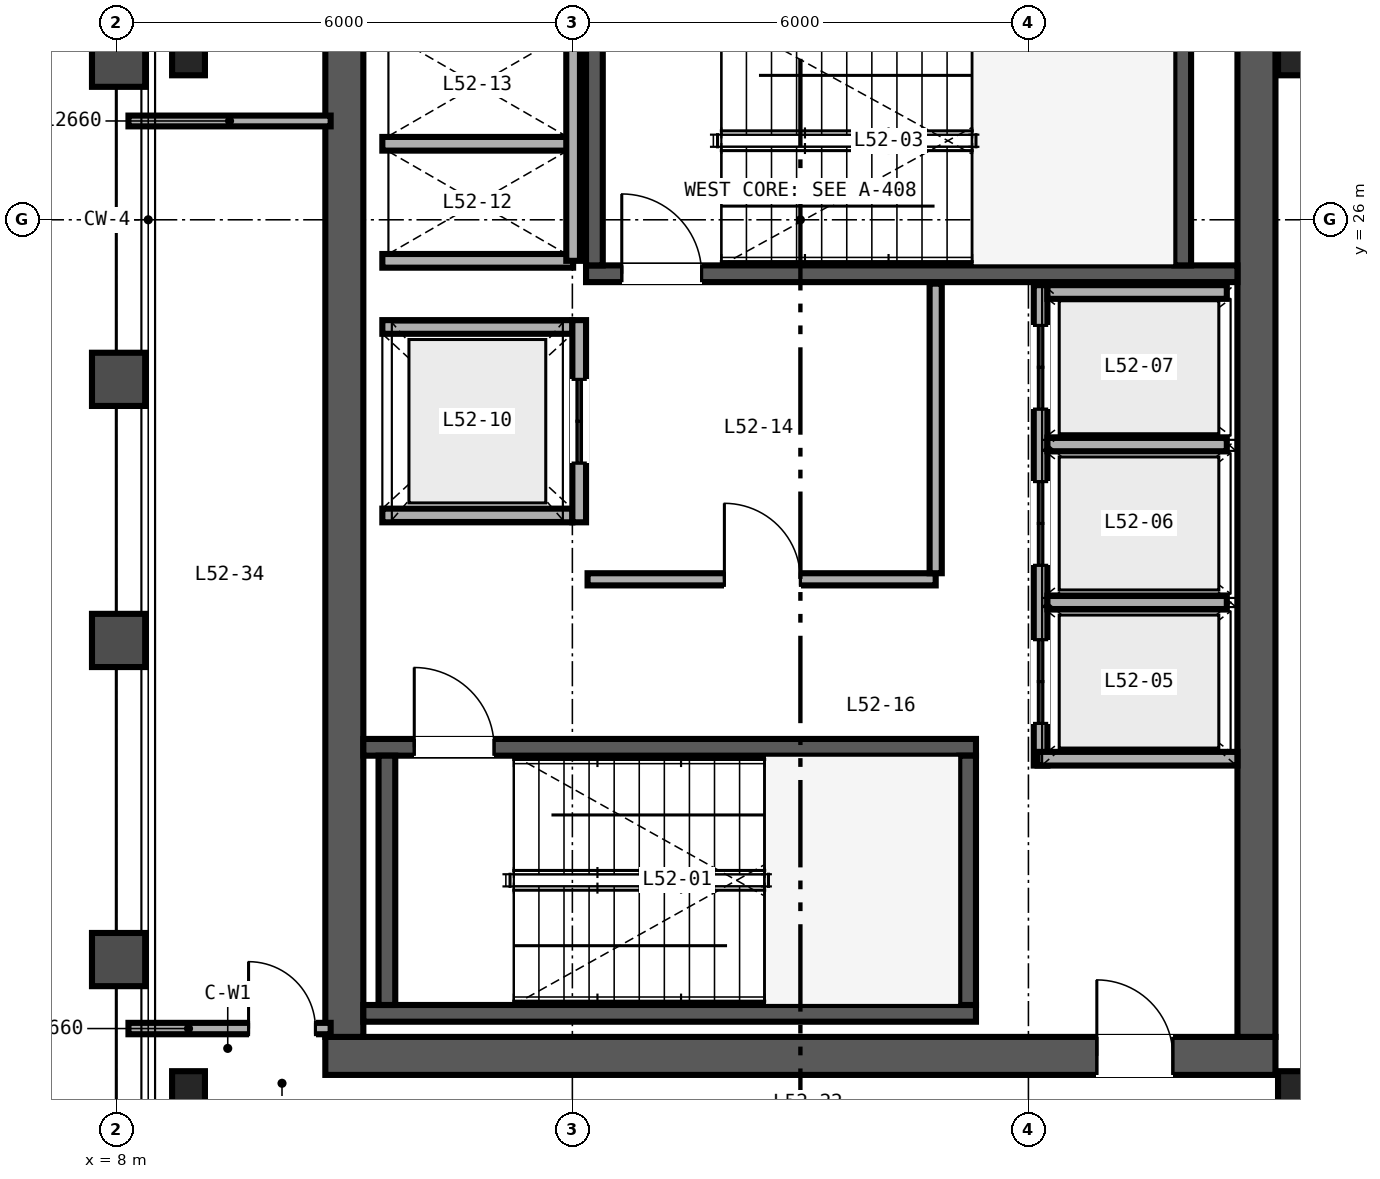
"""IFC4 building model, lengths in metres.
Left out: names, types, materials, properties, quantities, classifications, styles, units other than length and angle.
Written with IfcOpenShell. Run it as: python <this file> out.ifc"""

import sys

from ifc_helpers import new_model, si_unit, direction, frame, frame_2d, origin, origin_2d, place, context, subcontext, project, spatial, rectangle, i_section, extrude, source, transform, mapped, element, fill, save


model = new_model("IFC4")
c1 = context("Model", 3, precision=1e-05, world=origin(), true_north=direction((0.0, 1.0)))
c2 = subcontext(c1, "Body", "Model", "MODEL_VIEW")
j1 = project(units=[si_unit("LENGTHUNIT", "METRE"), si_unit("PLANEANGLEUNIT", "RADIAN")], contexts=[c1])
p1 = place(None, origin())
s1 = spatial("IfcSite", under=j1, at=p1, CompositionType="ELEMENT")
p2 = place(p1, origin())
s2 = spatial("IfcBuilding", under=s1, at=p2, CompositionType="ELEMENT")
p3 = place(p2, frame((0.0, 0.0, 206.4)))
s3 = spatial("IfcBuildingStorey", under=s2, at=p3, CompositionType="ELEMENT", Elevation=206.4)
p4 = place(p3, frame((10.75, 15.0, 0.0), z_axis=(0.0, 0.0, 1.0), x_axis=(1.0, 0.0, 0.0)))
e1 = element("IfcWall", 1, at=p4, inside=s3, PredefinedType="SHEAR", context=c2, shape_type="SweptSolid", body=[
    extrude(rectangle(XDim=12.5, YDim=0.5, at=frame_2d((6.25, 0.0))), origin(), (0.0, 0.0, 1.0), 3.37),
])
p5 = place(p4, frame((10.15, 0.0, 0.0)))
e2 = element("IfcOpeningElement", 2, at=p5, cuts=e1, PredefinedType="OPENING", context=c2, shape_type="SweptSolid", body=[
    extrude(rectangle(XDim=1.0, YDim=2.15, at=frame_2d((0.5, 1.075))), frame((0.0, 0.26, 0.0), z_axis=(0.0, -1.0, 0.0), x_axis=(1.0, 0.0, 0.0)), (0.0, 0.0, 1.0), 0.52),
])
for number, where, z_axis, x_axis in (
    (3, (11.0, 15.25, 0.0), (0.0, 0.0, 1.0), (0.0, 1.0, 0.0)),
    (4, (23.0, 15.25, 0.0), (0.0, 0.0, 1.0), (0.0, 1.0, 0.0)),
):
    element("IfcWall", number, at=place(p3, frame(where, z_axis=z_axis, x_axis=x_axis)), inside=s3, PredefinedType="SHEAR", context=c2, shape_type="SweptSolid", body=[
        extrude(rectangle(XDim=21.5, YDim=0.5, at=frame_2d((10.75, 0.0))), origin(), (0.0, 0.0, 1.0), 3.37),
    ])
p6 = place(p3, frame((11.25, 15.56, 0.0), z_axis=(0.0, 0.0, 1.0), x_axis=(1.0, 0.0, 0.0)))
e5 = element("IfcWall", 5, at=p6, inside=s3, PredefinedType="SHEAR", context=c2, shape_type="SweptSolid", body=[
    extrude(rectangle(XDim=8.06, YDim=0.22, at=frame_2d((4.03, 0.0))), origin(), (0.0, 0.0, 1.0), 3.4),
])
p7 = place(p3, frame((11.25, 19.06, 0.0), z_axis=(0.0, 0.0, 1.0), x_axis=(1.0, 0.0, 0.0)))
e6 = element("IfcWall", 6, at=p7, inside=s3, PredefinedType="SHEAR", context=c2, shape_type="SweptSolid", body=[
    extrude(rectangle(XDim=8.06, YDim=0.22, at=frame_2d((4.03, 0.0))), origin(), (0.0, 0.0, 1.0), 3.4),
])
p8 = place(p7, frame((0.67, 0.0, 0.0)))
e7 = element("IfcOpeningElement", 7, at=p8, cuts=e6, PredefinedType="OPENING", context=c2, shape_type="SweptSolid", body=[
    extrude(rectangle(XDim=1.05, YDim=2.15, at=frame_2d((0.525, 1.075))), frame((0.0, 0.12, 0.0), z_axis=(0.0, -1.0, 0.0), x_axis=(1.0, 0.0, 0.0)), (0.0, 0.0, 1.0), 0.24),
])
for number, where, z_axis, x_axis in (
    (8, (11.56, 15.67, 0.0), (0.0, 0.0, 1.0), (0.0, 1.0, 0.0)),
    (9, (19.2, 15.67, 0.0), (0.0, 0.0, 1.0), (0.0, 1.0, 0.0)),
):
    element("IfcWall", number, at=place(p3, frame(where, z_axis=z_axis, x_axis=x_axis)), inside=s3, PredefinedType="SHEAR", context=c2, shape_type="SweptSolid", body=[
        extrude(rectangle(XDim=3.28, YDim=0.22, at=frame_2d((1.64, 0.0))), origin(), (0.0, 0.0, 1.0), 3.4),
    ])
p9 = place(p3, frame((14.18, 25.29, 0.0), z_axis=(0.0, 0.0, 1.0), x_axis=(1.0, 0.0, 0.0)))
e10 = element("IfcWall", 10, at=p9, inside=s3, PredefinedType="SHEAR", context=c2, shape_type="SweptSolid", body=[
    extrude(rectangle(XDim=8.57, YDim=0.22, at=frame_2d((4.285, 0.0))), origin(), (0.0, 0.0, 1.0), 3.4),
])
p10 = place(p9, frame((0.47, 0.0, 0.0)))
e11 = element("IfcOpeningElement", 11, at=p10, cuts=e10, PredefinedType="OPENING", context=c2, shape_type="SweptSolid", body=[
    extrude(rectangle(XDim=1.05, YDim=2.15, at=frame_2d((0.525, 1.075))), frame((0.0, 0.12, 0.0), z_axis=(0.0, -1.0, 0.0), x_axis=(1.0, 0.0, 0.0)), (0.0, 0.0, 1.0), 0.24),
])
for number, where, z_axis, x_axis in (
    (12, (14.29, 25.4, 0.0), (0.0, 0.0, 1.0), (0.0, 1.0, 0.0)),
    (13, (22.03, 25.4, 0.0), (0.0, 0.0, 1.0), (0.0, 1.0, 0.0)),
):
    element("IfcWall", number, at=place(p3, frame(where, z_axis=z_axis, x_axis=x_axis)), inside=s3, PredefinedType="SHEAR", context=c2, shape_type="SweptSolid", body=[
        extrude(rectangle(XDim=3.28, YDim=0.22, at=frame_2d((1.64, 0.0))), origin(), (0.0, 0.0, 1.0), 3.4),
    ])
m1 = source(origin(), c2, "Body", "SweptSolid", [
    extrude(i_section(OverallWidth=0.432, OverallDepth=0.498, WebThickness=0.056, FlangeThickness=0.089, FilletRadius=0.025, at=origin_2d()), origin(), (0.0, 0.0, 1.0), 3.37),
])
for number, where, z_axis, x_axis in (
    (14, (8.95, 14.55, 0.0), (0.0, 0.0, 1.0), (1.0, 0.0, 0.0)),
    (15, (23.5, 14.55, 0.0), (0.0, 0.0, 1.0), (1.0, 0.0, 0.0)),
    (16, (8.95, 28.15, 0.0), (0.0, 0.0, 1.0), (1.0, 0.0, 0.0)),
    (17, (23.5, 28.15, 0.0), (0.0, 0.0, 1.0), (1.0, 0.0, 0.0)),
):
    element("IfcColumn", number, at=place(p3, frame(where, z_axis=z_axis, x_axis=x_axis)), inside=s3, PredefinedType="COLUMN", context=c2, shape_type="MappedRepresentation", body=[
        mapped(m1, transform((0.0, 0.0, 0.0), scale=1.0)),
    ])
p11 = place(p3, frame((20.16, 18.82, 0.0), z_axis=(0.0, 0.0, 1.0), x_axis=(0.0, 1.0, 0.0)))
e18 = element("IfcWall", 18, at=p11, inside=s3, PredefinedType="SOLIDWALL", context=c2, shape_type="SweptSolid", body=[
    extrude(rectangle(XDim=6.32, YDim=0.18, at=frame_2d((3.16, 0.0))), origin(), (0.0, 0.0, 1.0), 2.47),
])
p12 = place(p11, frame((0.555, 0.0, 0.0)))
e19 = element("IfcOpeningElement", 19, at=p12, cuts=e18, PredefinedType="OPENING", context=c2, shape_type="SweptSolid", body=[
    extrude(rectangle(XDim=1.1, YDim=2.2, at=frame_2d((0.55, 1.1))), frame((0.0, 0.1, 0.0), z_axis=(0.0, -1.0, 0.0), x_axis=(1.0, 0.0, 0.0)), (0.0, 0.0, 1.0), 0.2),
])
p13 = place(p11, frame((2.635, 0.0, 0.0)))
e20 = element("IfcOpeningElement", 20, at=p13, cuts=e18, PredefinedType="OPENING", context=c2, shape_type="SweptSolid", body=[
    extrude(rectangle(XDim=1.1, YDim=2.2, at=frame_2d((0.55, 1.1))), frame((0.0, 0.1, 0.0), z_axis=(0.0, -1.0, 0.0), x_axis=(1.0, 0.0, 0.0)), (0.0, 0.0, 1.0), 0.2),
])
p14 = place(p11, frame((4.69, 0.0, 0.0)))
e21 = element("IfcOpeningElement", 21, at=p14, cuts=e18, PredefinedType="OPENING", context=c2, shape_type="SweptSolid", body=[
    extrude(rectangle(XDim=1.1, YDim=2.2, at=frame_2d((0.55, 1.1))), frame((0.0, 0.1, 0.0), z_axis=(0.0, -1.0, 0.0), x_axis=(1.0, 0.0, 0.0)), (0.0, 0.0, 1.0), 0.2),
])
p15 = place(p3, frame((20.12, 18.91, 0.0), z_axis=(0.0, 0.0, 1.0), x_axis=(1.0, 0.0, 0.0)))
e22 = element("IfcWall", 22, at=p15, inside=s3, PredefinedType="SOLIDWALL", context=c2, shape_type="SweptSolid", body=[
    extrude(rectangle(XDim=2.63, YDim=0.18, at=frame_2d((1.315, 0.0))), origin(), (0.0, 0.0, 1.0), 3.37),
])
p16 = place(p3, frame((20.25, 25.05, 0.0), z_axis=(0.0, 0.0, 1.0), x_axis=(1.0, 0.0, 0.0)))
e23 = element("IfcWall", 23, at=p16, inside=s3, PredefinedType="SOLIDWALL", context=c2, shape_type="SweptSolid", body=[
    extrude(rectangle(XDim=2.36, YDim=0.18, at=frame_2d((1.18, 0.0))), origin(), (0.0, 0.0, 1.0), 3.37),
])
p17 = place(p3, frame((20.25, 20.965, 0.0), z_axis=(0.0, 0.0, 1.0), x_axis=(1.0, 0.0, 0.0)))
e24 = element("IfcWall", 24, at=p17, inside=s3, PredefinedType="SOLIDWALL", context=c2, shape_type="SweptSolid", body=[
    extrude(rectangle(XDim=2.36, YDim=0.18, at=frame_2d((1.18, 0.0))), origin(), (0.0, 0.0, 1.0), 2.47),
])
p18 = place(p3, frame((20.25, 23.045, 0.0), z_axis=(0.0, 0.0, 1.0), x_axis=(1.0, 0.0, 0.0)))
e25 = element("IfcWall", 25, at=p18, inside=s3, PredefinedType="SOLIDWALL", context=c2, shape_type="SweptSolid", body=[
    extrude(rectangle(XDim=2.36, YDim=0.18, at=frame_2d((1.18, 0.0))), origin(), (0.0, 0.0, 1.0), 3.37),
])
for number, where, z_axis, x_axis in (
    (26, (11.5, 22.11, 0.0), (0.0, 0.0, 1.0), (1.0, 0.0, 0.0)),
    (27, (11.5, 24.59, 0.0), (0.0, 0.0, 1.0), (1.0, 0.0, 0.0)),
):
    element("IfcWall", number, at=place(p3, frame(where, z_axis=z_axis, x_axis=x_axis)), inside=s3, PredefinedType="SOLIDWALL", context=c2, shape_type="SweptSolid", body=[
        extrude(rectangle(XDim=2.5, YDim=0.18, at=frame_2d((1.25, 0.0))), origin(), (0.0, 0.0, 1.0), 3.37),
    ])
p19 = place(p3, frame((14.09, 22.02, 0.0), z_axis=(0.0, 0.0, 1.0), x_axis=(0.0, 1.0, 0.0)))
e28 = element("IfcWall", 28, at=p19, inside=s3, PredefinedType="SOLIDWALL", context=c2, shape_type="SweptSolid", body=[
    extrude(rectangle(XDim=2.66, YDim=0.18, at=frame_2d((1.33, 0.0))), origin(), (0.0, 0.0, 1.0), 3.37),
])
p20 = place(p19, frame((0.78, 0.0, 0.0)))
e29 = element("IfcOpeningElement", 29, at=p20, cuts=e28, PredefinedType="OPENING", context=c2, shape_type="SweptSolid", body=[
    extrude(rectangle(XDim=1.1, YDim=2.2, at=frame_2d((0.55, 1.1))), frame((0.0, 0.1, 0.0), z_axis=(0.0, -1.0, 0.0), x_axis=(1.0, 0.0, 0.0)), (0.0, 0.0, 1.0), 0.2),
])
for number, where, z_axis, x_axis in (
    (30, (11.5, 25.46, 0.0), (0.0, 0.0, 1.0), (1.0, 0.0, 0.0)),
    (31, (11.5, 27.0, 0.0), (0.0, 0.0, 1.0), (1.0, 0.0, 0.0)),
):
    element("IfcWall", number, at=place(p3, frame(where, z_axis=z_axis, x_axis=x_axis)), inside=s3, PredefinedType="SOLIDWALL", context=c2, shape_type="SweptSolid", body=[
        extrude(rectangle(XDim=2.51, YDim=0.18, at=frame_2d((1.255, 0.0))), origin(), (0.0, 0.0, 1.0), 3.37),
    ])
p21 = place(p3, frame((14.01, 25.46, 0.0), z_axis=(0.0, 0.0, 1.0), x_axis=(0.0, 1.0, 0.0)))
e32 = element("IfcWall", 32, at=p21, inside=s3, PredefinedType="SOLIDWALL", context=c2, shape_type="SweptSolid", body=[
    extrude(rectangle(XDim=3.08, YDim=0.18, at=frame_2d((1.54, 0.0))), origin(), (0.0, 0.0, 1.0), 3.37),
])
p22 = place(p3, frame((14.2, 21.27, 0.0), z_axis=(0.0, 0.0, 1.0), x_axis=(1.0, 0.0, 0.0)))
e33 = element("IfcWall", 33, at=p22, inside=s3, PredefinedType="PARTITIONING", context=c2, shape_type="SweptSolid", body=[
    extrude(rectangle(XDim=4.58, YDim=0.16, at=frame_2d((2.29, 0.0))), origin(), (0.0, 0.0, 1.0), 3.37),
])
p23 = place(p22, frame((1.8, 0.0, 0.0)))
e34 = element("IfcOpeningElement", 34, at=p23, cuts=e33, PredefinedType="OPENING", context=c2, shape_type="SweptSolid", body=[
    extrude(rectangle(XDim=1.0, YDim=2.15, at=frame_2d((0.5, 1.075))), frame((0.0, 0.09, 0.0), z_axis=(0.0, -1.0, 0.0), x_axis=(1.0, 0.0, 0.0)), (0.0, 0.0, 1.0), 0.18),
])
p24 = place(p3, frame((18.78, 21.35, 0.0), z_axis=(0.0, 0.0, 1.0), x_axis=(0.0, 1.0, 0.0)))
e35 = element("IfcWall", 35, at=p24, inside=s3, PredefinedType="PARTITIONING", context=c2, shape_type="SweptSolid", body=[
    extrude(rectangle(XDim=3.81, YDim=0.16, at=frame_2d((1.905, 0.0))), origin(), (0.0, 0.0, 1.0), 3.37),
])
p25 = place(p3, frame((8.16, 15.36, 0.0), z_axis=(0.0, 0.0, 1.0), x_axis=(1.0, 0.0, 0.0)))
e36 = element("IfcWall", 36, at=p25, inside=s3, PredefinedType="PARTITIONING", context=c2, shape_type="SweptSolid", body=[
    extrude(rectangle(XDim=2.66, YDim=0.15, at=frame_2d((1.33, 0.0))), origin(), (0.0, 0.0, 1.0), 2.591),
])
p26 = place(p25, frame((1.58, 0.0, 0.0)))
e37 = element("IfcOpeningElement", 37, at=p26, cuts=e36, PredefinedType="OPENING", context=c2, shape_type="SweptSolid", body=[
    extrude(rectangle(XDim=0.88, YDim=2.15, at=frame_2d((0.44, 1.075))), frame((0.0, 0.085, 0.0), z_axis=(0.0, -1.0, 0.0), x_axis=(1.0, 0.0, 0.0)), (0.0, 0.0, 1.0), 0.17),
])
p27 = place(p3, frame((8.16, 27.3, 0.0), z_axis=(0.0, 0.0, 1.0), x_axis=(1.0, 0.0, 0.0)))
e38 = element("IfcWall", 38, at=p27, inside=s3, PredefinedType="PARTITIONING", context=c2, shape_type="SweptSolid", body=[
    extrude(rectangle(XDim=2.66, YDim=0.142, at=frame_2d((1.33, 0.0))), origin(), (0.0, 0.0, 1.0), 2.591),
])
m2 = source(origin(), c2, "Body", "SweptSolid", [
    extrude(rectangle(XDim=1.05, YDim=2.15, at=frame_2d((0.525, 1.075))), frame((0.0, 0.025, 0.0), z_axis=(0.0, -1.0, 0.0), x_axis=(1.0, 0.0, 0.0)), (0.0, 0.0, 1.0), 0.05),
])
p28 = place(p8, origin())
e39 = element("IfcDoor", 39, at=p28, inside=s3, OperationType="SINGLE_SWING_LEFT", PredefinedType="DOOR", context=c2, shape_type="MappedRepresentation", body=[
    mapped(m2, transform((0.0, 0.0, 0.0), scale=1.0)),
])
fill(e7, e39)
p29 = place(p10, origin())
e40 = element("IfcDoor", 40, at=p29, inside=s3, OperationType="SINGLE_SWING_LEFT", PredefinedType="DOOR", context=c2, shape_type="MappedRepresentation", body=[
    mapped(m2, transform((0.0, 0.0, 0.0), scale=1.0)),
])
fill(e11, e40)
m3 = source(origin(), c2, "Body", "SweptSolid", [
    extrude(rectangle(XDim=1.1, YDim=2.2, at=frame_2d((0.55, 1.1))), frame((0.0, 0.025, 0.0), z_axis=(0.0, -1.0, 0.0), x_axis=(1.0, 0.0, 0.0)), (0.0, 0.0, 1.0), 0.05),
])
p30 = place(p12, origin())
e41 = element("IfcDoor", 41, at=p30, inside=s3, OperationType="DOUBLE_DOOR_SLIDING", PredefinedType="DOOR", context=c2, shape_type="MappedRepresentation", body=[
    mapped(m3, transform((0.0, 0.0, 0.0), scale=1.0)),
])
fill(e19, e41)
p31 = place(p13, origin())
e42 = element("IfcDoor", 42, at=p31, inside=s3, OperationType="DOUBLE_DOOR_SLIDING", PredefinedType="DOOR", context=c2, shape_type="MappedRepresentation", body=[
    mapped(m3, transform((0.0, 0.0, 0.0), scale=1.0)),
])
fill(e20, e42)
p32 = place(p14, origin())
e43 = element("IfcDoor", 43, at=p32, inside=s3, OperationType="DOUBLE_DOOR_SLIDING", PredefinedType="DOOR", context=c2, shape_type="MappedRepresentation", body=[
    mapped(m3, transform((0.0, 0.0, 0.0), scale=1.0)),
])
fill(e21, e43)
p33 = place(p20, origin())
e44 = element("IfcDoor", 44, at=p33, inside=s3, OperationType="DOUBLE_DOOR_SLIDING", PredefinedType="DOOR", context=c2, shape_type="MappedRepresentation", body=[
    mapped(m3, transform((0.0, 0.0, 0.0), scale=1.0)),
])
fill(e29, e44)
m4 = source(origin(), c2, "Body", "SweptSolid", [
    extrude(rectangle(XDim=1.0, YDim=2.15, at=frame_2d((0.5, 1.075))), frame((0.0, 0.025, 0.0), z_axis=(0.0, -1.0, 0.0), x_axis=(1.0, 0.0, 0.0)), (0.0, 0.0, 1.0), 0.05),
])
p34 = place(p23, origin())
e45 = element("IfcDoor", 45, at=p34, inside=s3, OperationType="SINGLE_SWING_LEFT", PredefinedType="DOOR", context=c2, shape_type="MappedRepresentation", body=[
    mapped(m4, transform((0.0, 0.0, 0.0), scale=1.0)),
])
fill(e34, e45)
p35 = place(p5, origin())
e46 = element("IfcDoor", 46, at=p35, inside=s3, OperationType="SINGLE_SWING_LEFT", PredefinedType="DOOR", context=c2, shape_type="MappedRepresentation", body=[
    mapped(m4, transform((0.0, 0.0, 0.0), scale=1.0)),
])
fill(e2, e46)
m5 = source(origin(), c2, "Body", "SweptSolid", [
    extrude(rectangle(XDim=0.88, YDim=2.15, at=frame_2d((0.44, 1.075))), frame((0.0, 0.025, 0.0), z_axis=(0.0, -1.0, 0.0), x_axis=(1.0, 0.0, 0.0)), (0.0, 0.0, 1.0), 0.05),
])
p36 = place(p26, origin())
e47 = element("IfcDoor", 47, at=p36, inside=s3, OperationType="SINGLE_SWING_LEFT", PredefinedType="DOOR", context=c2, shape_type="MappedRepresentation", body=[
    mapped(m5, transform((0.0, 0.0, 0.0), scale=1.0)),
])
fill(e37, e47)
save(model, sys.argv[1])
